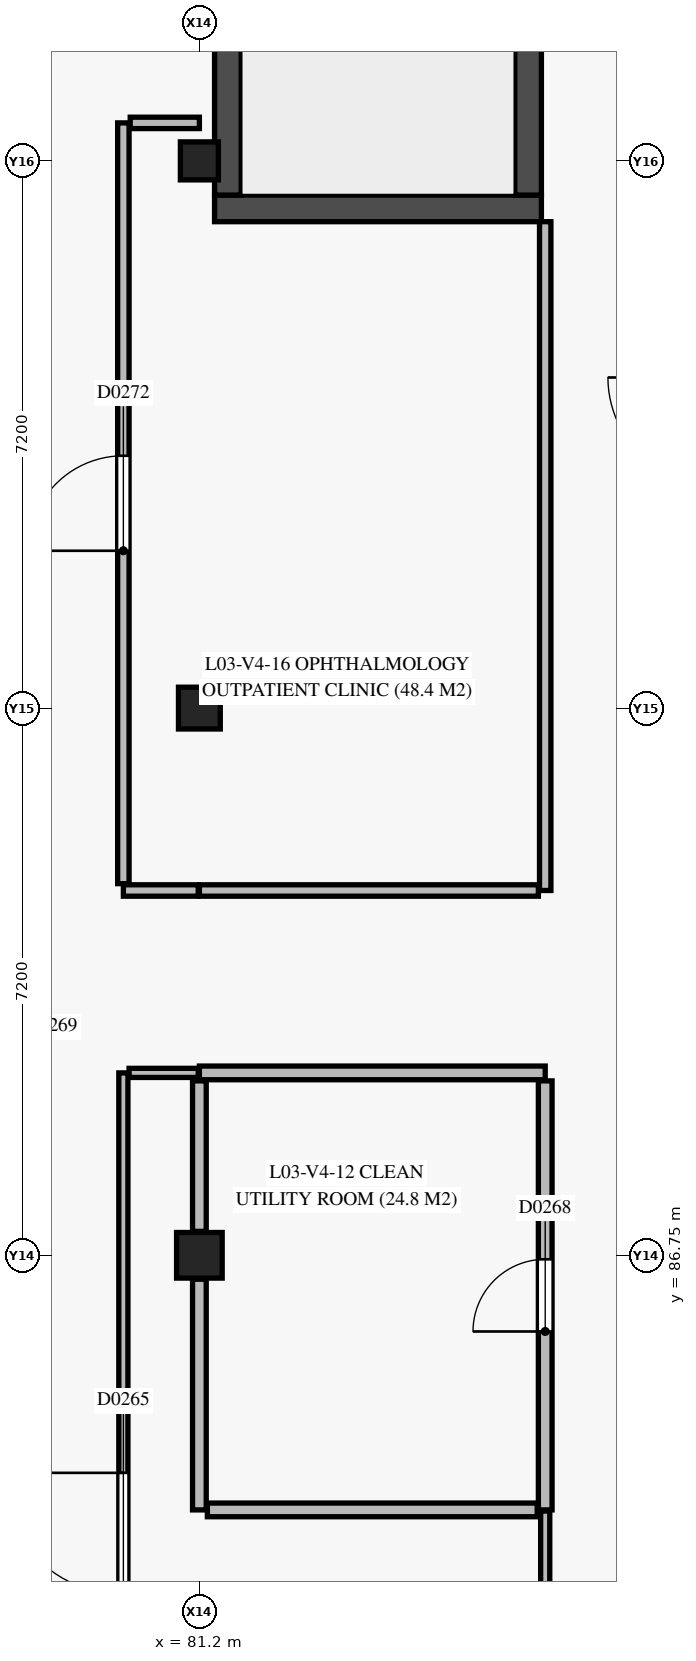
"""IFC4 building model, lengths in metres.
Left out: names, types, materials, properties, quantities, classifications, styles, units other than length and angle.
Written with IfcOpenShell. Run it as: python <this file> out.ifc"""

import sys

from ifc_helpers import new_model, si_unit, direction, frame, frame_2d, origin, origin_2d, place, context, subcontext, project, spatial, rectangle, extrude, element, fill, save


model = new_model("IFC4")
c1 = context("Model", 3, precision=1e-05, world=origin(), true_north=direction((0.0, 1.0)))
c2 = subcontext(c1, "Body", "Model", "MODEL_VIEW")
j1 = project(units=[si_unit("LENGTHUNIT", "METRE"), si_unit("PLANEANGLEUNIT", "RADIAN")], contexts=[c1])
p1 = place(None, origin())
s1 = spatial("IfcSite", under=j1, at=p1, CompositionType="ELEMENT")
p2 = place(p1, origin())
s2 = spatial("IfcBuilding", under=s1, at=p2, CompositionType="ELEMENT")
p3 = place(p2, frame((0.0, 0.0, 13.2)))
s3 = spatial("IfcBuildingStorey", under=s2, at=p3, CompositionType="ELEMENT", Elevation=13.2)
p4 = place(p3, frame((81.2, 86.75, 0.0), z_axis=(0.0, 0.0, 1.0), x_axis=(1.0, 0.0, 0.0)))
e1 = element("IfcColumn", 1, at=p4, inside=s3, PredefinedType="COLUMN", context=c2, shape_type="SweptSolid", body=[
    extrude(rectangle(XDim=0.6, YDim=0.6, at=origin_2d()), origin(), (0.0, 0.0, 1.0), 4.2),
])
p5 = place(p3, frame((81.2, 93.95, 0.0), z_axis=(0.0, 0.0, 1.0), x_axis=(1.0, 0.0, 0.0)))
e2 = element("IfcColumn", 2, at=p5, inside=s3, PredefinedType="COLUMN", context=c2, shape_type="SweptSolid", body=[
    extrude(rectangle(XDim=0.55, YDim=0.55, at=origin_2d()), origin(), (0.0, 0.0, 1.0), 4.2),
])
p6 = place(p3, frame((81.2, 101.15, 0.0), z_axis=(0.0, 0.0, 1.0), x_axis=(1.0, 0.0, 0.0)))
e3 = element("IfcColumn", 3, at=p6, inside=s3, PredefinedType="COLUMN", context=c2, shape_type="SweptSolid", body=[
    extrude(rectangle(XDim=0.5, YDim=0.5, at=origin_2d()), origin(), (0.0, 0.0, 1.0), 4.2),
])
p7 = place(p3, frame((81.4, 100.525, 0.0), z_axis=(0.0, 0.0, 1.0), x_axis=(1.0, 0.0, 0.0)))
e4 = element("IfcWall", 4, at=p7, inside=s3, PredefinedType="SHEAR", context=c2, shape_type="SweptSolid", body=[
    extrude(rectangle(XDim=4.3, YDim=0.35, at=frame_2d((2.15, 0.0))), origin(), (0.0, 0.0, 1.0), 3.95),
])
p8 = place(p3, frame((81.575, 100.7, 0.0), z_axis=(0.0, 0.0, 1.0), x_axis=(0.0, 1.0, 0.0)))
e5 = element("IfcWall", 5, at=p8, inside=s3, PredefinedType="SHEAR", context=c2, shape_type="SweptSolid", body=[
    extrude(rectangle(XDim=7.3, YDim=0.35, at=frame_2d((3.65, 0.0))), origin(), (0.0, 0.0, 1.0), 3.95),
])
p9 = place(p3, frame((85.525, 100.7, 0.0), z_axis=(0.0, 0.0, 1.0), x_axis=(0.0, 1.0, 0.0)))
e6 = element("IfcWall", 6, at=p9, inside=s3, PredefinedType="SHEAR", context=c2, shape_type="SweptSolid", body=[
    extrude(rectangle(XDim=7.3, YDim=0.35, at=frame_2d((3.65, 0.0))), origin(), (0.0, 0.0, 1.0), 3.95),
])
p10 = place(p9, frame((5.68, 0.0, 0.0)))
e7 = element("IfcOpeningElement", 7, at=p10, cuts=e6, PredefinedType="OPENING", context=c2, shape_type="SweptSolid", body=[
    extrude(rectangle(XDim=1.5, YDim=2.15, at=frame_2d((0.75, 1.075))), frame((0.0, 0.185, 0.0), z_axis=(0.0, -1.0, 0.0), x_axis=(1.0, 0.0, 0.0)), (0.0, 0.0, 1.0), 0.37),
])
p11 = place(p3, frame((81.2, 89.15, 0.0), z_axis=(0.0, 0.0, 1.0), x_axis=(1.0, 0.0, 0.0)))
e8 = element("IfcWall", 8, at=p11, inside=s3, PredefinedType="PLUMBINGWALL", context=c2, shape_type="SweptSolid", body=[
    extrude(rectangle(XDim=4.55, YDim=0.18, at=frame_2d((2.275, 0.0))), origin(), (0.0, 0.0, 1.0), 3.135),
])
p12 = place(p3, frame((85.75, 83.4, 0.0), z_axis=(0.0, 0.0, 1.0), x_axis=(0.0, 1.0, 0.0)))
e9 = element("IfcWall", 9, at=p12, inside=s3, PredefinedType="PLUMBINGWALL", context=c2, shape_type="SweptSolid", body=[
    extrude(rectangle(XDim=5.645, YDim=0.18, at=frame_2d((2.823, 0.0))), origin(), (0.0, 0.0, 1.0), 3.135),
])
p13 = place(p12, frame((2.347, 0.0, 0.0)))
e10 = element("IfcOpeningElement", 10, at=p13, cuts=e9, PredefinedType="OPENING", context=c2, shape_type="SweptSolid", body=[
    extrude(rectangle(XDim=0.95, YDim=2.1, at=frame_2d((0.475, 1.05))), frame((0.0, 0.1, 0.0), z_axis=(0.0, -1.0, 0.0), x_axis=(1.0, 0.0, 0.0)), (0.0, 0.0, 1.0), 0.2),
])
p14 = place(p3, frame((85.75, 91.55, 0.0), z_axis=(0.0, 0.0, 1.0), x_axis=(0.0, 1.0, 0.0)))
e11 = element("IfcWall", 11, at=p14, inside=s3, PredefinedType="PARTITIONING", context=c2, shape_type="SweptSolid", body=[
    extrude(rectangle(XDim=8.8, YDim=0.15, at=frame_2d((4.4, 0.0))), origin(), (0.0, 0.0, 1.0), 3.285),
])
p15 = place(p3, frame((81.2, 91.55, 0.0), z_axis=(0.0, 0.0, 1.0), x_axis=(1.0, 0.0, 0.0)))
e12 = element("IfcWall", 12, at=p15, inside=s3, PredefinedType="PARTITIONING", context=c2, shape_type="SweptSolid", body=[
    extrude(rectangle(XDim=4.46, YDim=0.15, at=frame_2d((2.23, 0.0))), origin(), (0.0, 0.0, 1.0), 3.135),
])
p16 = place(p3, frame((80.2, 91.55, 0.0), z_axis=(0.0, 0.0, 1.0), x_axis=(1.0, 0.0, 0.0)))
e13 = element("IfcWall", 13, at=p16, inside=s3, PredefinedType="PARTITIONING", context=c2, shape_type="SweptSolid", body=[
    extrude(rectangle(XDim=0.985, YDim=0.15, at=frame_2d((0.493, 0.0))), origin(), (0.0, 0.0, 1.0), 3.135),
])
p17 = place(p3, frame((80.2, 91.64, 0.0), z_axis=(0.0, 0.0, 1.0), x_axis=(0.0, 1.0, 0.0)))
e14 = element("IfcWall", 14, at=p17, inside=s3, PredefinedType="PARTITIONING", context=c2, shape_type="SweptSolid", body=[
    extrude(rectangle(XDim=10.01, YDim=0.15, at=frame_2d((5.005, 0.0))), origin(), (0.0, 0.0, 1.0), 3.285),
])
p18 = place(p17, frame((4.38, 0.0, 0.0)))
e15 = element("IfcOpeningElement", 15, at=p18, cuts=e14, PredefinedType="OPENING", context=c2, shape_type="SweptSolid", body=[
    extrude(rectangle(XDim=1.25, YDim=2.15, at=frame_2d((0.625, 1.075))), frame((0.0, 0.085, 0.0), z_axis=(0.0, -1.0, 0.0), x_axis=(1.0, 0.0, 0.0)), (0.0, 0.0, 1.0), 0.17),
])
p19 = place(p3, frame((80.29, 101.65, 0.0), z_axis=(0.0, 0.0, 1.0), x_axis=(1.0, 0.0, 0.0)))
e16 = element("IfcWall", 16, at=p19, inside=s3, PredefinedType="PARTITIONING", context=c2, shape_type="SweptSolid", body=[
    extrude(rectangle(XDim=0.91, YDim=0.15, at=frame_2d((0.455, 0.0))), origin(), (0.0, 0.0, 1.0), 3.355),
])
p20 = place(p3, frame((85.75, 76.95, 0.0), z_axis=(0.0, 0.0, 1.0), x_axis=(0.0, 1.0, 0.0)))
e17 = element("IfcWall", 17, at=p20, inside=s3, PredefinedType="PARTITIONING", context=c2, shape_type="SweptSolid", body=[
    extrude(rectangle(XDim=6.435, YDim=0.12, at=frame_2d((3.218, 0.0))), origin(), (0.0, 0.0, 1.0), 3.415),
])
p21 = place(p3, frame((80.2, 77.025, 0.0), z_axis=(0.0, 0.0, 1.0), x_axis=(0.0, 1.0, 0.0)))
e18 = element("IfcWall", 18, at=p21, inside=s3, PredefinedType="PARTITIONING", context=c2, shape_type="SweptSolid", body=[
    extrude(rectangle(XDim=12.125, YDim=0.12, at=frame_2d((6.062, 0.0))), origin(), (0.0, 0.0, 1.0), 3.285),
])
p22 = place(p21, frame((5.262, 0.0, 0.0)))
e19 = element("IfcOpeningElement", 19, at=p22, cuts=e18, PredefinedType="OPENING", context=c2, shape_type="SweptSolid", body=[
    extrude(rectangle(XDim=1.6, YDim=2.25, at=frame_2d((0.8, 1.125))), frame((0.0, 0.07, 0.0), z_axis=(0.0, -1.0, 0.0), x_axis=(1.0, 0.0, 0.0)), (0.0, 0.0, 1.0), 0.14),
])
p23 = place(p3, frame((80.275, 89.15, 0.0), z_axis=(0.0, 0.0, 1.0), x_axis=(1.0, 0.0, 0.0)))
e20 = element("IfcWall", 20, at=p23, inside=s3, PredefinedType="PARTITIONING", context=c2, shape_type="SweptSolid", body=[
    extrude(rectangle(XDim=0.91, YDim=0.12, at=frame_2d((0.455, 0.0))), origin(), (0.0, 0.0, 1.0), 3.135),
])
p24 = place(p3, frame((81.2, 83.4, 0.0), z_axis=(0.0, 0.0, 1.0), x_axis=(0.0, 1.0, 0.0)))
e21 = element("IfcWall", 21, at=p24, inside=s3, PredefinedType="PLUMBINGWALL", context=c2, shape_type="SweptSolid", body=[
    extrude(rectangle(XDim=3.035, YDim=0.18, at=frame_2d((1.518, 0.0))), origin(), (0.0, 0.0, 1.0), 3.385),
])
p25 = place(p3, frame((81.2, 87.065, 0.0), z_axis=(0.0, 0.0, 1.0), x_axis=(0.0, 1.0, 0.0)))
e22 = element("IfcWall", 22, at=p25, inside=s3, PredefinedType="PLUMBINGWALL", context=c2, shape_type="SweptSolid", body=[
    extrude(rectangle(XDim=1.98, YDim=0.18, at=frame_2d((0.99, 0.0))), origin(), (0.0, 0.0, 1.0), 3.135),
])
p26 = place(p3, frame((81.305, 83.4, 0.0), z_axis=(0.0, 0.0, 1.0), x_axis=(1.0, 0.0, 0.0)))
e23 = element("IfcWall", 23, at=p26, inside=s3, PredefinedType="PLUMBINGWALL", context=c2, shape_type="SweptSolid", body=[
    extrude(rectangle(XDim=4.34, YDim=0.18, at=frame_2d((2.17, 0.0))), origin(), (0.0, 0.0, 1.0), 3.95),
])
p27 = place(p22, origin())
e24 = element("IfcDoor", 24, at=p27, inside=s3, OperationType="SINGLE_SWING_RIGHT", PredefinedType="DOOR", context=c2, shape_type="SweptSolid", body=[
    extrude(rectangle(XDim=1.6, YDim=2.25, at=frame_2d((0.8, 1.125))), frame((0.0, 0.025, 0.0), z_axis=(0.0, -1.0, 0.0), x_axis=(1.0, 0.0, 0.0)), (0.0, 0.0, 1.0), 0.05),
])
fill(e19, e24)
p28 = place(p13, origin())
e25 = element("IfcDoor", 25, at=p28, inside=s3, OperationType="SINGLE_SWING_LEFT", PredefinedType="DOOR", context=c2, shape_type="SweptSolid", body=[
    extrude(rectangle(XDim=0.95, YDim=2.1, at=frame_2d((0.475, 1.05))), frame((0.0, 0.025, 0.0), z_axis=(0.0, -1.0, 0.0), x_axis=(1.0, 0.0, 0.0)), (0.0, 0.0, 1.0), 0.05),
])
fill(e10, e25)
p29 = place(p18, origin())
e26 = element("IfcDoor", 26, at=p29, inside=s3, OperationType="SINGLE_SWING_LEFT", PredefinedType="DOOR", context=c2, shape_type="SweptSolid", body=[
    extrude(rectangle(XDim=1.25, YDim=2.15, at=frame_2d((0.625, 1.075))), frame((0.0, 0.025, 0.0), z_axis=(0.0, -1.0, 0.0), x_axis=(1.0, 0.0, 0.0)), (0.0, 0.0, 1.0), 0.05),
])
fill(e15, e26)
save(model, sys.argv[1])
